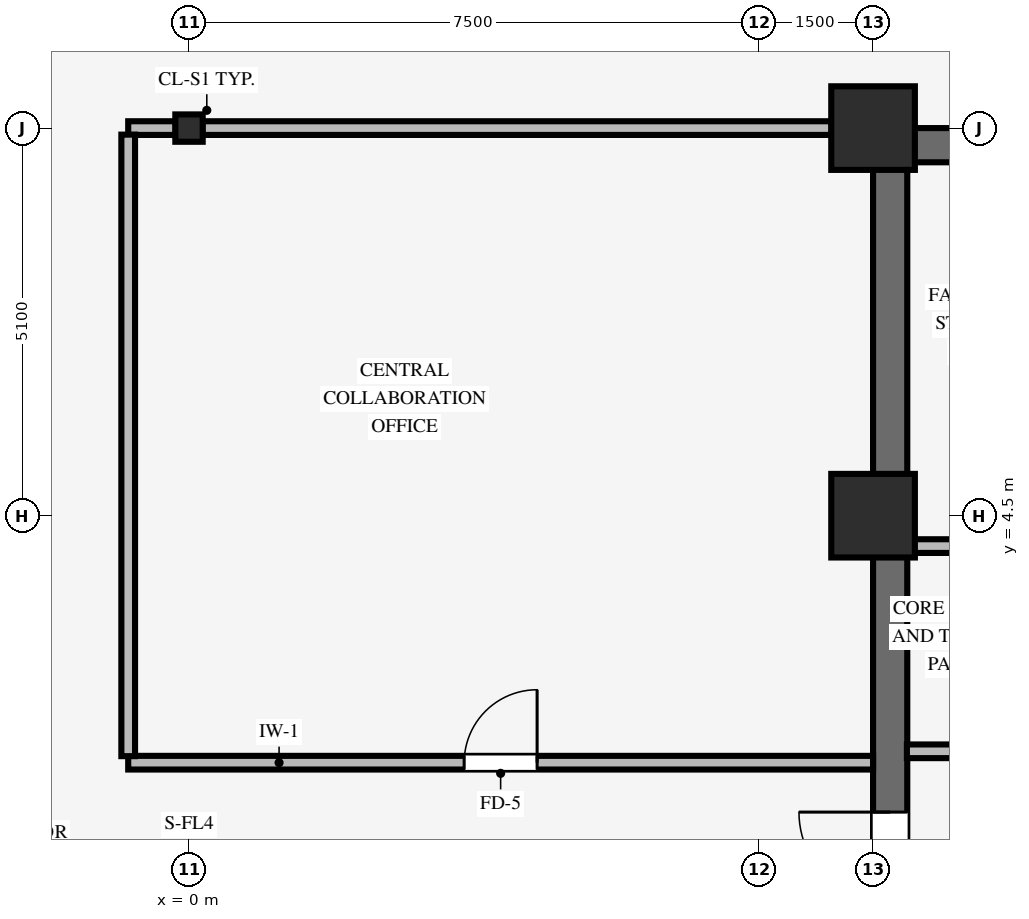
"""IFC4 building model, lengths in metres.
Left out: names, types, materials, properties, quantities, classifications, styles, units other than length and angle.
Written with IfcOpenShell. Run it as: python <this file> out.ifc"""

import sys

from ifc_helpers import new_model, si_unit, direction, frame, frame_2d, origin, origin_2d, place, context, subcontext, project, spatial, rectangle, i_section, extrude, source, transform, mapped, element, fill, save


model = new_model("IFC4")
c1 = context("Model", 3, precision=1e-05, world=origin(), true_north=direction((0.0, 1.0)))
c2 = subcontext(c1, "Body", "Model", "MODEL_VIEW")
j1 = project(units=[si_unit("LENGTHUNIT", "METRE"), si_unit("PLANEANGLEUNIT", "RADIAN")], contexts=[c1])
p1 = place(None, origin())
s1 = spatial("IfcSite", under=j1, at=p1, CompositionType="ELEMENT")
p2 = place(p1, origin())
s2 = spatial("IfcBuilding", under=s1, at=p2, CompositionType="ELEMENT")
p3 = place(p2, frame((0.0, 0.0, 64.1)))
s3 = spatial("IfcBuildingStorey", under=s2, at=p3, CompositionType="ELEMENT", Elevation=64.1)
p4 = place(p3, frame((9.0, 9.375, 0.0), z_axis=(0.0, 0.0, 1.0), x_axis=(1.0, 0.0, 0.0)))
e1 = element("IfcWall", 1, at=p4, inside=s3, PredefinedType="SHEAR", context=c2, shape_type="SweptSolid", body=[
    extrude(rectangle(XDim=8.5, YDim=0.45, at=frame_2d((4.25, 0.0))), origin(), (0.0, 0.0, 1.0), 3.37),
])
p5 = place(p3, frame((9.225, -9.155, 0.0), z_axis=(0.0, 0.0, 1.0), x_axis=(0.0, 1.0, 0.0)))
e2 = element("IfcWall", 2, at=p5, inside=s3, PredefinedType="SHEAR", context=c2, shape_type="SweptSolid", body=[
    extrude(rectangle(XDim=18.31, YDim=0.45, at=frame_2d((9.155, 0.0))), origin(), (0.0, 0.0, 1.0), 3.37),
])
p6 = place(p5, frame((8.555, 0.0, 0.0)))
e3 = element("IfcOpeningElement", 3, at=p6, cuts=e2, PredefinedType="OPENING", context=c2, shape_type="SweptSolid", body=[
    extrude(rectangle(XDim=1.2, YDim=2.15, at=frame_2d((0.6, 1.075))), frame((0.0, 0.235, 0.0), z_axis=(0.0, -1.0, 0.0), x_axis=(1.0, 0.0, 0.0)), (0.0, 0.0, 1.0), 0.47),
])
for number, where, z_axis, x_axis in (
    (4, (9.0, 4.5, 0.0), (0.0, 0.0, 1.0), (1.0, 0.0, 0.0)),
    (5, (9.0, 9.6, 0.0), (0.0, 0.0, 1.0), (1.0, 0.0, 0.0)),
):
    element("IfcColumn", number, at=place(p3, frame(where, z_axis=z_axis, x_axis=x_axis)), inside=s3, PredefinedType="COLUMN", context=c2, shape_type="SweptSolid", body=[
        extrude(rectangle(XDim=1.1, YDim=1.1, at=origin_2d()), origin(), (0.0, 0.0, 1.0), 3.37),
    ])
p7 = place(p3, frame((0.0, 9.6, 0.0), z_axis=(0.0, 0.0, 1.0), x_axis=(1.0, 0.0, 0.0)))
e6 = element("IfcColumn", 6, at=p7, inside=s3, PredefinedType="COLUMN", context=c2, shape_type="SweptSolid", body=[
    extrude(i_section(OverallWidth=0.36, OverallDepth=0.36, WebThickness=0.021, FlangeThickness=0.021, FilletRadius=0.018, at=origin_2d()), origin(), (0.0, 0.0, 1.0), 3.37),
])
p8 = place(p3, frame((9.445, 1.4, 0.0), z_axis=(0.0, 0.0, 1.0), x_axis=(1.0, 0.0, 0.0)))
e7 = element("IfcWall", 7, at=p8, inside=s3, PredefinedType="PARTITIONING", context=c2, shape_type="SweptSolid", body=[
    extrude(rectangle(XDim=3.9, YDim=0.18, at=frame_2d((1.95, 0.0))), origin(), (0.0, 0.0, 1.0), 3.36),
])
p9 = place(p8, frame((2.315, 0.0, 0.0)))
e8 = element("IfcOpeningElement", 8, at=p9, cuts=e7, PredefinedType="OPENING", context=c2, shape_type="SweptSolid", body=[
    extrude(rectangle(XDim=0.88, YDim=2.1, at=frame_2d((0.44, 1.05))), frame((0.0, 0.1, 0.0), z_axis=(0.0, -1.0, 0.0), x_axis=(1.0, 0.0, 0.0)), (0.0, 0.0, 1.0), 0.2),
])
p10 = place(p3, frame((9.445, 4.1, 0.0), z_axis=(0.0, 0.0, 1.0), x_axis=(1.0, 0.0, 0.0)))
e9 = element("IfcWall", 9, at=p10, inside=s3, PredefinedType="PARTITIONING", context=c2, shape_type="SweptSolid", body=[
    extrude(rectangle(XDim=3.9, YDim=0.18, at=frame_2d((1.95, 0.0))), origin(), (0.0, 0.0, 1.0), 3.36),
])
p11 = place(p10, frame((0.8, 0.0, 0.0)))
e10 = element("IfcOpeningElement", 10, at=p11, cuts=e9, PredefinedType="OPENING", context=c2, shape_type="SweptSolid", body=[
    extrude(rectangle(XDim=0.88, YDim=2.1, at=frame_2d((0.44, 1.05))), frame((0.0, 0.1, 0.0), z_axis=(0.0, -1.0, 0.0), x_axis=(1.0, 0.0, 0.0)), (0.0, 0.0, 1.0), 0.2),
])
p12 = place(p10, frame((2.565, 0.0, 0.0)))
e11 = element("IfcOpeningElement", 11, at=p12, cuts=e9, PredefinedType="OPENING", context=c2, shape_type="SweptSolid", body=[
    extrude(rectangle(XDim=0.88, YDim=2.1, at=frame_2d((0.44, 1.05))), frame((0.0, 0.1, 0.0), z_axis=(0.0, -1.0, 0.0), x_axis=(1.0, 0.0, 0.0)), (0.0, 0.0, 1.0), 0.2),
])
p13 = place(p3, frame((-0.8, 1.25, 0.0), z_axis=(0.0, 0.0, 1.0), x_axis=(1.0, 0.0, 0.0)))
e12 = element("IfcWall", 12, at=p13, inside=s3, PredefinedType="PARTITIONING", context=c2, shape_type="SweptSolid", body=[
    extrude(rectangle(XDim=9.8, YDim=0.18, at=frame_2d((4.9, 0.0))), origin(), (0.0, 0.0, 1.0), 3.36),
])
p14 = place(p13, frame((4.42, 0.0, 0.0)))
e13 = element("IfcOpeningElement", 13, at=p14, cuts=e12, PredefinedType="OPENING", context=c2, shape_type="SweptSolid", body=[
    extrude(rectangle(XDim=0.96, YDim=2.1, at=frame_2d((0.48, 1.05))), frame((0.0, 0.1, 0.0), z_axis=(0.0, -1.0, 0.0), x_axis=(1.0, 0.0, 0.0)), (0.0, 0.0, 1.0), 0.2),
])
p15 = place(p3, frame((-0.8, 9.6, 0.0), z_axis=(0.0, 0.0, 1.0), x_axis=(1.0, 0.0, 0.0)))
e14 = element("IfcWall", 14, at=p15, inside=s3, PredefinedType="PARTITIONING", context=c2, shape_type="SweptSolid", body=[
    extrude(rectangle(XDim=0.624, YDim=0.18, at=frame_2d((0.312, 0.0))), origin(), (0.0, 0.0, 1.0), 2.405),
])
p16 = place(p3, frame((0.176, 9.6, 0.0), z_axis=(0.0, 0.0, 1.0), x_axis=(1.0, 0.0, 0.0)))
e15 = element("IfcWall", 15, at=p16, inside=s3, PredefinedType="PARTITIONING", context=c2, shape_type="SweptSolid", body=[
    extrude(rectangle(XDim=8.278, YDim=0.18, at=frame_2d((4.139, 0.0))), origin(), (0.0, 0.0, 1.0), 2.405),
])
p17 = place(p3, frame((-0.8, 1.336, 0.0), z_axis=(0.0, 0.0, 1.0), x_axis=(0.0, 1.0, 0.0)))
e16 = element("IfcWall", 16, at=p17, inside=s3, PredefinedType="PARTITIONING", context=c2, shape_type="SweptSolid", body=[
    extrude(rectangle(XDim=8.178, YDim=0.18, at=frame_2d((4.089, 0.0))), origin(), (0.0, 0.0, 1.0), 3.36),
])
m1 = source(origin(), c2, "Body", "SweptSolid", [
    extrude(rectangle(XDim=1.2, YDim=2.15, at=frame_2d((0.6, 1.075))), frame((0.0, 0.025, 0.0), z_axis=(0.0, -1.0, 0.0), x_axis=(1.0, 0.0, 0.0)), (0.0, 0.0, 1.0), 0.05),
])
p18 = place(p6, origin())
e17 = element("IfcDoor", 17, at=p18, inside=s3, OperationType="SINGLE_SWING_RIGHT", PredefinedType="DOOR", context=c2, shape_type="MappedRepresentation", body=[
    mapped(m1, transform((0.0, 0.0, 0.0), scale=1.0)),
])
fill(e3, e17)
m2 = source(origin(), c2, "Body", "SweptSolid", [
    extrude(rectangle(XDim=0.96, YDim=2.1, at=frame_2d((0.48, 1.05))), frame((0.0, 0.025, 0.0), z_axis=(0.0, -1.0, 0.0), x_axis=(1.0, 0.0, 0.0)), (0.0, 0.0, 1.0), 0.05),
])
p19 = place(p14, origin())
e18 = element("IfcDoor", 18, at=p19, inside=s3, OperationType="SINGLE_SWING_RIGHT", PredefinedType="DOOR", context=c2, shape_type="MappedRepresentation", body=[
    mapped(m2, transform((0.0, 0.0, 0.0), scale=1.0)),
])
fill(e13, e18)
save(model, sys.argv[1])
